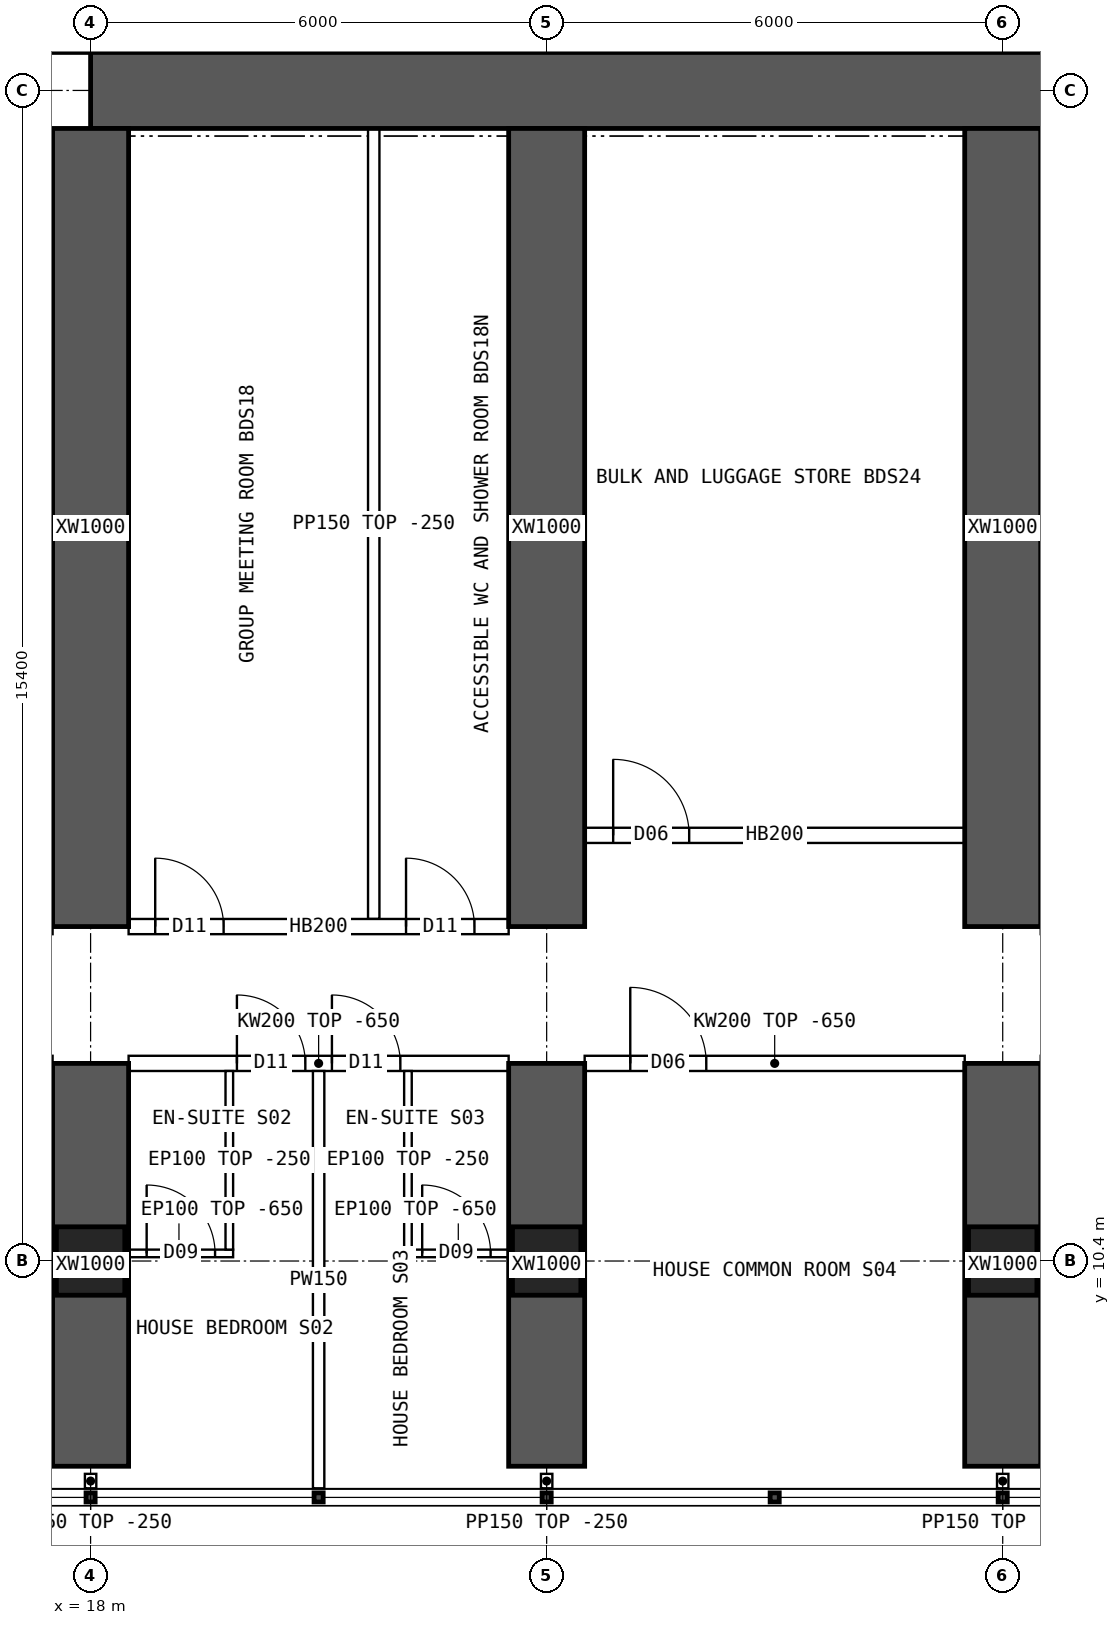
"""IFC4 building model, lengths in metres.
Left out: names, types, materials, properties, quantities, classifications, styles, units other than length and angle.
Written with IfcOpenShell. Run it as: python <this file> out.ifc"""

import sys

from ifc_helpers import new_model, si_unit, direction, frame, frame_2d, origin, origin_2d, place, context, subcontext, project, spatial, polyline, rectangle, hollow_rectangle, outline, extrude, element, fill, save


model = new_model("IFC4")
c1 = context("Model", 3, precision=1e-05, world=origin(), true_north=direction((0.0, 1.0)))
c2 = subcontext(c1, "Body", "Model", "MODEL_VIEW")
j1 = project(units=[si_unit("LENGTHUNIT", "METRE"), si_unit("PLANEANGLEUNIT", "RADIAN")], contexts=[c1])
p1 = place(None, origin())
s1 = spatial("IfcSite", under=j1, at=p1, CompositionType="ELEMENT")
p2 = place(p1, origin())
s2 = spatial("IfcBuilding", under=s1, at=p2, CompositionType="ELEMENT")
p3 = place(p2, frame((0.0, 0.0, 27.7)))
s3 = spatial("IfcBuildingStorey", under=s2, at=p3, CompositionType="ELEMENT", Elevation=27.7)
for number, where, z_axis, x_axis in (
    (1, (18.0, 10.4, 0.0), (0.0, 0.0, 1.0), (1.0, 0.0, 0.0)),
    (2, (24.0, 10.4, 0.0), (0.0, 0.0, 1.0), (1.0, 0.0, 0.0)),
    (3, (30.0, 10.4, 0.0), (0.0, 0.0, 1.0), (1.0, 0.0, 0.0)),
):
    element("IfcColumn", number, at=place(p3, frame(where, z_axis=z_axis, x_axis=x_axis)), inside=s3, PredefinedType="COLUMN", context=c2, shape_type="SweptSolid", body=[
        extrude(hollow_rectangle(XDim=0.9, YDim=0.9, WallThickness=0.09, at=origin_2d()), origin(), (0.0, 0.0, 1.0), 3.75),
    ])
p4 = place(p3, frame((18.0, 25.8, 0.0), z_axis=(0.0, 0.0, 1.0), x_axis=(1.0, 0.0, 0.0)))
e4 = element("IfcWall", 4, at=p4, inside=s3, PredefinedType="SHEAR", context=c2, shape_type="SweptSolid", body=[
    extrude(rectangle(XDim=48.0, YDim=1.0, at=frame_2d((24.0, 0.0))), origin(), (0.0, 0.0, 1.0), 3.75),
])
p5 = place(p3, frame((18.0, 7.7, 0.0), z_axis=(0.0, 0.0, 1.0), x_axis=(0.0, 1.0, 0.0)))
e5 = element("IfcWall", 5, at=p5, inside=s3, PredefinedType="SHEAR", context=c2, shape_type="SweptSolid", body=[
    extrude(rectangle(XDim=5.3, YDim=1.0, at=frame_2d((2.65, 0.0))), origin(), (0.0, 0.0, 1.0), 3.75),
])
p6 = place(p3, frame((18.0, 14.8, 0.0), z_axis=(0.0, 0.0, 1.0), x_axis=(0.0, 1.0, 0.0)))
e6 = element("IfcWall", 6, at=p6, inside=s3, PredefinedType="SHEAR", context=c2, shape_type="SweptSolid", body=[
    extrude(rectangle(XDim=10.5, YDim=1.0, at=frame_2d((5.25, 0.0))), origin(), (0.0, 0.0, 1.0), 3.75),
])
p7 = place(p3, frame((24.0, 7.7, 0.0), z_axis=(0.0, 0.0, 1.0), x_axis=(0.0, 1.0, 0.0)))
e7 = element("IfcWall", 7, at=p7, inside=s3, PredefinedType="SHEAR", context=c2, shape_type="SweptSolid", body=[
    extrude(rectangle(XDim=5.3, YDim=1.0, at=frame_2d((2.65, 0.0))), origin(), (0.0, 0.0, 1.0), 3.75),
])
p8 = place(p3, frame((24.0, 14.8, 0.0), z_axis=(0.0, 0.0, 1.0), x_axis=(0.0, 1.0, 0.0)))
e8 = element("IfcWall", 8, at=p8, inside=s3, PredefinedType="SHEAR", context=c2, shape_type="SweptSolid", body=[
    extrude(rectangle(XDim=10.5, YDim=1.0, at=frame_2d((5.25, 0.0))), origin(), (0.0, 0.0, 1.0), 3.75),
])
p9 = place(p3, frame((30.0, 7.7, 0.0), z_axis=(0.0, 0.0, 1.0), x_axis=(0.0, 1.0, 0.0)))
e9 = element("IfcWall", 9, at=p9, inside=s3, PredefinedType="SHEAR", context=c2, shape_type="SweptSolid", body=[
    extrude(rectangle(XDim=5.3, YDim=1.0, at=frame_2d((2.65, 0.0))), origin(), (0.0, 0.0, 1.0), 3.75),
])
p10 = place(p3, frame((30.0, 14.8, 0.0), z_axis=(0.0, 0.0, 1.0), x_axis=(0.0, 1.0, 0.0)))
e10 = element("IfcWall", 10, at=p10, inside=s3, PredefinedType="SHEAR", context=c2, shape_type="SweptSolid", body=[
    extrude(rectangle(XDim=10.5, YDim=1.0, at=frame_2d((5.25, 0.0))), origin(), (0.0, 0.0, 1.0), 3.75),
])
p11 = place(p3, frame((18.5, 13.0, 0.0), z_axis=(0.0, 0.0, 1.0), x_axis=(1.0, 0.0, 0.0)))
e11 = element("IfcWall", 11, at=p11, inside=s3, PredefinedType="SOLIDWALL", context=c2, shape_type="SweptSolid", body=[
    extrude(outline(polyline([(0.0, 0.0), (5.0, 0.0), (5.0, 3.1), (0.0, 3.1), (0.0, 0.0)])), frame((0.0, 0.1, 0.0), z_axis=(0.0, -1.0, 0.0), x_axis=(1.0, 0.0, 0.0)), (0.0, 0.0, 1.0), 0.2),
])
p12 = place(p11, frame((1.425, 0.0, 0.0)))
e12 = element("IfcOpeningElement", 12, at=p12, cuts=e11, PredefinedType="OPENING", context=c2, shape_type="SweptSolid", body=[
    extrude(rectangle(XDim=0.9, YDim=2.1, at=frame_2d((0.45, 1.05))), frame((0.0, 0.11, 0.0), z_axis=(0.0, -1.0, 0.0), x_axis=(1.0, 0.0, 0.0)), (0.0, 0.0, 1.0), 0.22),
])
p13 = place(p11, frame((2.675, 0.0, 0.0)))
e13 = element("IfcOpeningElement", 13, at=p13, cuts=e11, PredefinedType="OPENING", context=c2, shape_type="SweptSolid", body=[
    extrude(rectangle(XDim=0.9, YDim=2.1, at=frame_2d((0.45, 1.05))), frame((0.0, 0.11, 0.0), z_axis=(0.0, -1.0, 0.0), x_axis=(1.0, 0.0, 0.0)), (0.0, 0.0, 1.0), 0.22),
])
p14 = place(p3, frame((18.5, 14.8, 0.0), z_axis=(0.0, 0.0, 1.0), x_axis=(1.0, 0.0, 0.0)))
e14 = element("IfcWall", 14, at=p14, inside=s3, PredefinedType="SOLIDWALL", context=c2, shape_type="SweptSolid", body=[
    extrude(rectangle(XDim=5.0, YDim=0.2, at=frame_2d((2.5, 0.0))), origin(), (0.0, 0.0, 1.0), 3.5),
])
p15 = place(p14, frame((0.35, 0.0, 0.0)))
e15 = element("IfcOpeningElement", 15, at=p15, cuts=e14, PredefinedType="OPENING", context=c2, shape_type="SweptSolid", body=[
    extrude(rectangle(XDim=0.9, YDim=2.1, at=frame_2d((0.45, 1.05))), frame((0.0, 0.11, 0.0), z_axis=(0.0, -1.0, 0.0), x_axis=(1.0, 0.0, 0.0)), (0.0, 0.0, 1.0), 0.22),
])
p16 = place(p14, frame((3.65, 0.0, 0.0)))
e16 = element("IfcOpeningElement", 16, at=p16, cuts=e14, PredefinedType="OPENING", context=c2, shape_type="SweptSolid", body=[
    extrude(rectangle(XDim=0.9, YDim=2.1, at=frame_2d((0.45, 1.05))), frame((0.0, 0.11, 0.0), z_axis=(0.0, -1.0, 0.0), x_axis=(1.0, 0.0, 0.0)), (0.0, 0.0, 1.0), 0.22),
])
p17 = place(p3, frame((24.5, 13.0, 0.0), z_axis=(0.0, 0.0, 1.0), x_axis=(1.0, 0.0, 0.0)))
e17 = element("IfcWall", 17, at=p17, inside=s3, PredefinedType="SOLIDWALL", context=c2, shape_type="SweptSolid", body=[
    extrude(outline(polyline([(0.0, 0.0), (5.0, 0.0), (5.0, 3.1), (0.0, 3.1), (0.0, 0.0)])), frame((0.0, 0.1, 0.0), z_axis=(0.0, -1.0, 0.0), x_axis=(1.0, 0.0, 0.0)), (0.0, 0.0, 1.0), 0.2),
])
p18 = place(p17, frame((0.6, 0.0, 0.0)))
e18 = element("IfcOpeningElement", 18, at=p18, cuts=e17, PredefinedType="OPENING", context=c2, shape_type="SweptSolid", body=[
    extrude(rectangle(XDim=1.0, YDim=2.1, at=frame_2d((0.5, 1.05))), frame((0.0, 0.11, 0.0), z_axis=(0.0, -1.0, 0.0), x_axis=(1.0, 0.0, 0.0)), (0.0, 0.0, 1.0), 0.22),
])
p19 = place(p3, frame((17.55, 10.5, 0.0), z_axis=(0.0, 0.0, 1.0), x_axis=(-1.0, 0.0, 0.0)))
e19 = element("IfcWall", 19, at=p19, inside=s3, PredefinedType="PARTITIONING", context=c2, shape_type="SweptSolid", body=[
    extrude(outline(polyline([(0.0, 0.0), (1.425, 0.0), (1.425, 3.1), (0.0, 3.1), (0.0, 0.0)])), frame((0.0, 0.05, 0.0), z_axis=(0.0, -1.0, 0.0), x_axis=(1.0, 0.0, 0.0)), (0.0, 0.0, 1.0), 0.1),
])
p20 = place(p19, frame((0.288, 0.0, 0.0)))
e20 = element("IfcOpeningElement", 20, at=p20, cuts=e19, PredefinedType="OPENING", context=c2, shape_type="SweptSolid", body=[
    extrude(rectangle(XDim=0.9, YDim=2.1, at=frame_2d((0.45, 1.05))), frame((0.0, 0.06, 0.0), z_axis=(0.0, -1.0, 0.0), x_axis=(1.0, 0.0, 0.0)), (0.0, 0.0, 1.0), 0.12),
])
p21 = place(p3, frame((21.0, 7.41, 0.0), z_axis=(0.0, 0.0, 1.0), x_axis=(0.0, 1.0, 0.0)))
e21 = element("IfcWall", 21, at=p21, inside=s3, PredefinedType="PARTITIONING", context=c2, shape_type="SweptSolid", body=[
    extrude(outline(polyline([(0.0, 0.0), (5.49, 0.0), (5.49, 3.1), (5.442, 3.1), (5.44, 3.5), (3.192, 3.5), (3.19, 3.1), (2.792, 3.1), (2.79, 3.5), (0.0, 3.5), (0.0, 0.0)])), frame((0.0, 0.075, 0.0), z_axis=(0.0, -1.0, 0.0), x_axis=(1.0, 0.0, 0.0)), (0.0, 0.0, 1.0), 0.15),
])
p22 = place(p3, frame((19.875, 10.5, 0.0), z_axis=(0.0, 0.0, 1.0), x_axis=(-1.0, 0.0, 0.0)))
e22 = element("IfcWall", 22, at=p22, inside=s3, PredefinedType="PARTITIONING", context=c2, shape_type="SweptSolid", body=[
    extrude(outline(polyline([(0.0, 0.0), (1.425, 0.0), (1.425, 3.1), (0.0, 3.1), (0.0, 0.0)])), frame((0.0, 0.05, 0.0), z_axis=(0.0, -1.0, 0.0), x_axis=(1.0, 0.0, 0.0)), (0.0, 0.0, 1.0), 0.1),
])
p23 = place(p22, frame((0.238, 0.0, 0.0)))
e23 = element("IfcOpeningElement", 23, at=p23, cuts=e22, PredefinedType="OPENING", context=c2, shape_type="SweptSolid", body=[
    extrude(rectangle(XDim=0.9, YDim=2.1, at=frame_2d((0.45, 1.05))), frame((0.0, 0.06, 0.0), z_axis=(0.0, -1.0, 0.0), x_axis=(1.0, 0.0, 0.0)), (0.0, 0.0, 1.0), 0.12),
])
p24 = place(p3, frame((19.825, 10.55, 0.0), z_axis=(0.0, 0.0, 1.0), x_axis=(0.0, 1.0, 0.0)))
e24 = element("IfcWall", 24, at=p24, inside=s3, PredefinedType="PARTITIONING", context=c2, shape_type="SweptSolid", body=[
    extrude(outline(polyline([(0.0, 0.0), (2.35, 0.0), (2.35, 3.1), (2.302, 3.1), (2.3, 3.5), (0.052, 3.5), (0.05, 3.1), (0.0, 3.1), (0.0, 0.0)])), frame((0.0, 0.05, 0.0), z_axis=(0.0, -1.0, 0.0), x_axis=(1.0, 0.0, 0.0)), (0.0, 0.0, 1.0), 0.1),
])
p25 = place(p3, frame((23.55, 10.5, 0.0), z_axis=(0.0, 0.0, 1.0), x_axis=(-1.0, 0.0, 0.0)))
e25 = element("IfcWall", 25, at=p25, inside=s3, PredefinedType="PARTITIONING", context=c2, shape_type="SweptSolid", body=[
    extrude(outline(polyline([(0.0, 0.0), (1.425, 0.0), (1.425, 3.1), (0.0, 3.1), (0.0, 0.0)])), frame((0.0, 0.05, 0.0), z_axis=(0.0, -1.0, 0.0), x_axis=(1.0, 0.0, 0.0)), (0.0, 0.0, 1.0), 0.1),
])
p26 = place(p25, frame((0.288, 0.0, 0.0)))
e26 = element("IfcOpeningElement", 26, at=p26, cuts=e25, PredefinedType="OPENING", context=c2, shape_type="SweptSolid", body=[
    extrude(rectangle(XDim=0.9, YDim=2.1, at=frame_2d((0.45, 1.05))), frame((0.0, 0.06, 0.0), z_axis=(0.0, -1.0, 0.0), x_axis=(1.0, 0.0, 0.0)), (0.0, 0.0, 1.0), 0.12),
])
p27 = place(p3, frame((22.175, 10.55, 0.0), z_axis=(0.0, 0.0, 1.0), x_axis=(0.0, 1.0, 0.0)))
e27 = element("IfcWall", 27, at=p27, inside=s3, PredefinedType="PARTITIONING", context=c2, shape_type="SweptSolid", body=[
    extrude(outline(polyline([(0.0, 0.0), (2.35, 0.0), (2.35, 3.1), (2.302, 3.1), (2.3, 3.5), (0.052, 3.5), (0.05, 3.1), (0.0, 3.1), (0.0, 0.0)])), frame((0.0, 0.05, 0.0), z_axis=(0.0, -1.0, 0.0), x_axis=(1.0, 0.0, 0.0)), (0.0, 0.0, 1.0), 0.1),
])
p28 = place(p3, frame((31.875, 10.5, 0.0), z_axis=(0.0, 0.0, 1.0), x_axis=(-1.0, 0.0, 0.0)))
e28 = element("IfcWall", 28, at=p28, inside=s3, PredefinedType="PARTITIONING", context=c2, shape_type="SweptSolid", body=[
    extrude(outline(polyline([(0.0, 0.0), (1.425, 0.0), (1.425, 3.1), (0.0, 3.1), (0.0, 0.0)])), frame((0.0, 0.05, 0.0), z_axis=(0.0, -1.0, 0.0), x_axis=(1.0, 0.0, 0.0)), (0.0, 0.0, 1.0), 0.1),
])
p29 = place(p28, frame((0.238, 0.0, 0.0)))
e29 = element("IfcOpeningElement", 29, at=p29, cuts=e28, PredefinedType="OPENING", context=c2, shape_type="SweptSolid", body=[
    extrude(rectangle(XDim=0.9, YDim=2.1, at=frame_2d((0.45, 1.05))), frame((0.0, 0.06, 0.0), z_axis=(0.0, -1.0, 0.0), x_axis=(1.0, 0.0, 0.0)), (0.0, 0.0, 1.0), 0.12),
])
p30 = place(p3, frame((21.725, 14.9, 0.0), z_axis=(0.0, 0.0, 1.0), x_axis=(0.0, 1.0, 0.0)))
e30 = element("IfcWall", 30, at=p30, inside=s3, PredefinedType="PARTITIONING", context=c2, shape_type="SweptSolid", body=[
    extrude(rectangle(XDim=10.4, YDim=0.15, at=frame_2d((5.2, 0.0))), origin(), (0.0, 0.0, 1.0), 3.5),
])
p31 = place(p3, frame((24.5, 16.0, 0.0), z_axis=(0.0, 0.0, 1.0), x_axis=(1.0, 0.0, 0.0)))
e31 = element("IfcWall", 31, at=p31, inside=s3, PredefinedType="SOLIDWALL", context=c2, shape_type="SweptSolid", body=[
    extrude(rectangle(XDim=5.0, YDim=0.2, at=frame_2d((2.5, 0.0))), origin(), (0.0, 0.0, 1.0), 3.5),
])
p32 = place(p31, frame((0.375, 0.0, 0.0)))
e32 = element("IfcOpeningElement", 32, at=p32, cuts=e31, PredefinedType="OPENING", context=c2, shape_type="SweptSolid", body=[
    extrude(rectangle(XDim=1.0, YDim=2.1, at=frame_2d((0.5, 1.05))), frame((0.0, 0.11, 0.0), z_axis=(0.0, -1.0, 0.0), x_axis=(1.0, 0.0, 0.0)), (0.0, 0.0, 1.0), 0.22),
])
for number, where, z_axis, x_axis in (
    (33, (18.0, 7.6, 0.0), (0.0, 0.0, 1.0), (0.0, -1.0, 0.0)),
    (34, (24.0, 7.6, 0.0), (0.0, 0.0, 1.0), (0.0, -1.0, 0.0)),
    (35, (30.0, 7.6, 0.0), (0.0, 0.0, 1.0), (0.0, -1.0, 0.0)),
):
    element("IfcWall", number, at=place(p3, frame(where, z_axis=z_axis, x_axis=x_axis)), inside=s3, PredefinedType="PARTITIONING", context=c2, shape_type="SweptSolid", body=[
        extrude(rectangle(XDim=0.19, YDim=0.15, at=frame_2d((0.095, 0.0))), origin(), (0.0, 0.0, 1.0), 3.5),
    ])
p33 = place(p23, origin())
e36 = element("IfcDoor", 36, at=p33, inside=s3, OperationType="SINGLE_SWING_RIGHT", PredefinedType="DOOR", context=c2, shape_type="SweptSolid", body=[
    extrude(rectangle(XDim=0.9, YDim=2.1, at=frame_2d((0.45, 1.05))), frame((0.0, 0.025, 0.0), z_axis=(0.0, -1.0, 0.0), x_axis=(1.0, 0.0, 0.0)), (0.0, 0.0, 1.0), 0.05),
])
fill(e23, e36)
p34 = place(p12, origin())
e37 = element("IfcDoor", 37, at=p34, inside=s3, OperationType="SINGLE_SWING_LEFT", PredefinedType="DOOR", context=c2, shape_type="SweptSolid", body=[
    extrude(rectangle(XDim=0.9, YDim=2.1, at=frame_2d((0.45, 1.05))), frame((0.0, 0.025, 0.0), z_axis=(0.0, -1.0, 0.0), x_axis=(1.0, 0.0, 0.0)), (0.0, 0.0, 1.0), 0.05),
])
fill(e12, e37)
p35 = place(p26, origin())
e38 = element("IfcDoor", 38, at=p35, inside=s3, OperationType="SINGLE_SWING_RIGHT", PredefinedType="DOOR", context=c2, shape_type="SweptSolid", body=[
    extrude(rectangle(XDim=0.9, YDim=2.1, at=frame_2d((0.45, 1.05))), frame((0.0, 0.025, 0.0), z_axis=(0.0, -1.0, 0.0), x_axis=(1.0, 0.0, 0.0)), (0.0, 0.0, 1.0), 0.05),
])
fill(e26, e38)
p36 = place(p13, origin())
e39 = element("IfcDoor", 39, at=p36, inside=s3, OperationType="SINGLE_SWING_LEFT", PredefinedType="DOOR", context=c2, shape_type="SweptSolid", body=[
    extrude(rectangle(XDim=0.9, YDim=2.1, at=frame_2d((0.45, 1.05))), frame((0.0, 0.025, 0.0), z_axis=(0.0, -1.0, 0.0), x_axis=(1.0, 0.0, 0.0)), (0.0, 0.0, 1.0), 0.05),
])
fill(e13, e39)
p37 = place(p18, origin())
e40 = element("IfcDoor", 40, at=p37, inside=s3, OperationType="SINGLE_SWING_LEFT", PredefinedType="DOOR", context=c2, shape_type="SweptSolid", body=[
    extrude(rectangle(XDim=1.0, YDim=2.1, at=frame_2d((0.5, 1.05))), frame((0.0, 0.025, 0.0), z_axis=(0.0, -1.0, 0.0), x_axis=(1.0, 0.0, 0.0)), (0.0, 0.0, 1.0), 0.05),
])
fill(e18, e40)
p38 = place(p15, origin())
e41 = element("IfcDoor", 41, at=p38, inside=s3, OperationType="SINGLE_SWING_LEFT", PredefinedType="DOOR", context=c2, shape_type="SweptSolid", body=[
    extrude(rectangle(XDim=0.9, YDim=2.1, at=frame_2d((0.45, 1.05))), frame((0.0, 0.025, 0.0), z_axis=(0.0, -1.0, 0.0), x_axis=(1.0, 0.0, 0.0)), (0.0, 0.0, 1.0), 0.05),
])
fill(e15, e41)
p39 = place(p16, origin())
e42 = element("IfcDoor", 42, at=p39, inside=s3, OperationType="SINGLE_SWING_LEFT", PredefinedType="DOOR", context=c2, shape_type="SweptSolid", body=[
    extrude(rectangle(XDim=0.9, YDim=2.1, at=frame_2d((0.45, 1.05))), frame((0.0, 0.025, 0.0), z_axis=(0.0, -1.0, 0.0), x_axis=(1.0, 0.0, 0.0)), (0.0, 0.0, 1.0), 0.05),
])
fill(e16, e42)
p40 = place(p32, origin())
e43 = element("IfcDoor", 43, at=p40, inside=s3, OperationType="SINGLE_SWING_LEFT", PredefinedType="DOOR", context=c2, shape_type="SweptSolid", body=[
    extrude(rectangle(XDim=1.0, YDim=2.1, at=frame_2d((0.5, 1.05))), frame((0.0, 0.025, 0.0), z_axis=(0.0, -1.0, 0.0), x_axis=(1.0, 0.0, 0.0)), (0.0, 0.0, 1.0), 0.05),
])
fill(e32, e43)
save(model, sys.argv[1])
